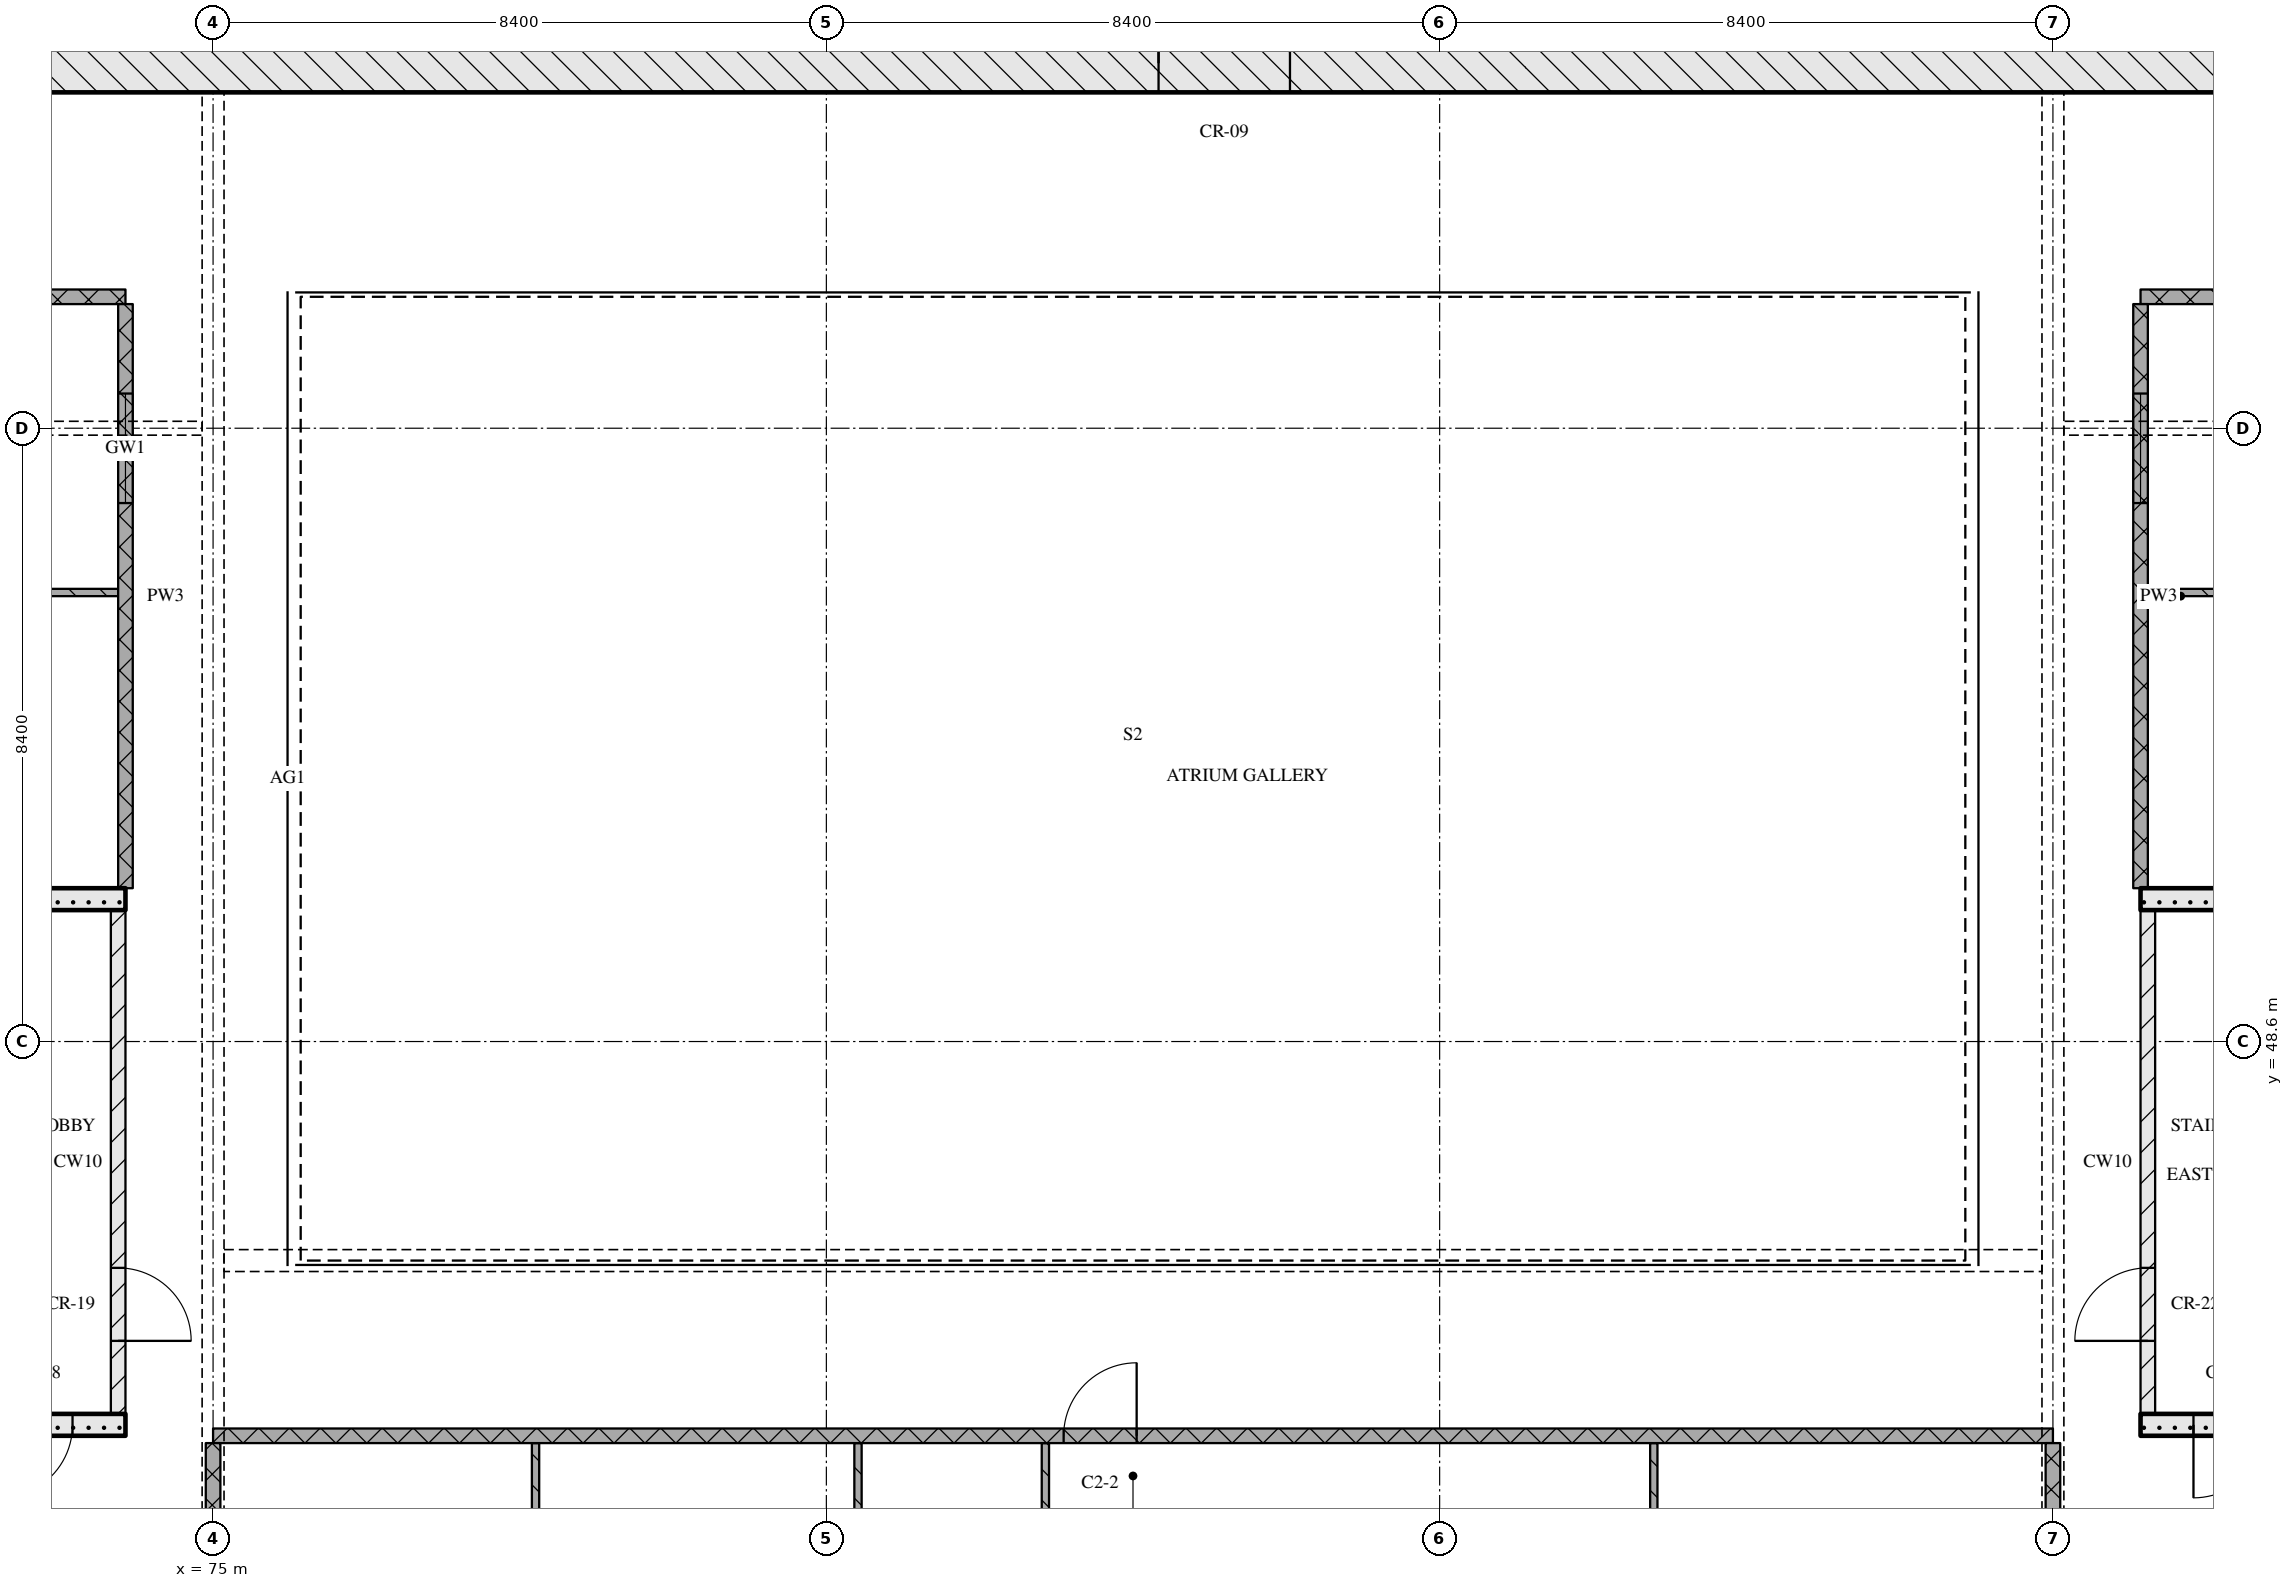
"""IFC4 building model, lengths in metres.
Left out: names, types, materials, properties, quantities, classifications, styles, units other than length and angle.
Written with IfcOpenShell. Run it as: python <this file> out.ifc"""

import sys

from ifc_helpers import new_model, si_unit, direction, frame, frame_2d, origin, place, context, subcontext, project, spatial, rectangle, extrude, element, fill, save


model = new_model("IFC4")
c1 = context("Model", 3, precision=1e-05, world=origin(), true_north=direction((0.0, 1.0)))
c2 = subcontext(c1, "Body", "Model", "MODEL_VIEW")
j1 = project(units=[si_unit("LENGTHUNIT", "METRE"), si_unit("PLANEANGLEUNIT", "RADIAN")], contexts=[c1])
p1 = place(None, origin())
s1 = spatial("IfcSite", under=j1, at=p1, CompositionType="ELEMENT")
p2 = place(p1, origin())
s2 = spatial("IfcBuilding", under=s1, at=p2, CompositionType="ELEMENT")
p3 = place(p2, frame((0.0, 0.0, 158.25)))
s3 = spatial("IfcBuildingStorey", under=s2, at=p3, CompositionType="ELEMENT", Elevation=158.25)
p4 = place(p3, frame((67.0, 62.0, 0.0), z_axis=(0.0, 0.0, 1.0), x_axis=(1.0, 0.0, 0.0)))
e1 = element("IfcWall", 1, at=p4, inside=s3, PredefinedType="SOLIDWALL", context=c2, shape_type="SweptSolid", body=[
    extrude(rectangle(XDim=41.2, YDim=0.8, at=frame_2d((20.6, 0.0))), origin(), (0.0, 0.0, 1.0), 3.32),
])
p5 = place(p4, frame((20.95, 0.0, 0.0)))
e2 = element("IfcOpeningElement", 2, at=p5, cuts=e1, PredefinedType="OPENING", context=c2, shape_type="SweptSolid", body=[
    extrude(rectangle(XDim=1.8, YDim=2.1, at=frame_2d((0.9, 1.05))), frame((0.0, 0.41, 0.0), z_axis=(0.0, -1.0, 0.0), x_axis=(1.0, 0.0, 0.0)), (0.0, 0.0, 1.0), 0.82),
])
p6 = place(p3, frame((68.2, 43.35, 0.0), z_axis=(0.0, 0.0, 1.0), x_axis=(1.0, 0.0, 0.0)))
e3 = element("IfcWall", 3, at=p6, inside=s3, PredefinedType="SOLIDWALL", context=c2, shape_type="SweptSolid", body=[
    extrude(rectangle(XDim=5.6, YDim=0.3, at=frame_2d((2.8, 0.0))), origin(), (0.0, 0.0, 1.0), 3.32),
])
p7 = place(p6, frame((3.875, 0.0, 0.0)))
e4 = element("IfcOpeningElement", 4, at=p7, cuts=e3, PredefinedType="OPENING", context=c2, shape_type="SweptSolid", body=[
    extrude(rectangle(XDim=1.0, YDim=2.1, at=frame_2d((0.5, 1.05))), frame((0.0, 0.16, 0.0), z_axis=(0.0, -1.0, 0.0), x_axis=(1.0, 0.0, 0.0)), (0.0, 0.0, 1.0), 0.32),
])
p8 = place(p3, frame((73.7, 43.5, 0.0), z_axis=(0.0, 0.0, 1.0), x_axis=(0.0, 1.0, 0.0)))
e5 = element("IfcWall", 5, at=p8, inside=s3, PredefinedType="PARTITIONING", context=c2, shape_type="SweptSolid", body=[
    extrude(rectangle(XDim=6.9, YDim=0.2, at=frame_2d((3.45, 0.0))), origin(), (0.0, 0.0, 1.0), 3.32),
])
p9 = place(p8, frame((1.0, 0.0, 0.0)))
e6 = element("IfcOpeningElement", 6, at=p9, cuts=e5, PredefinedType="OPENING", context=c2, shape_type="SweptSolid", body=[
    extrude(rectangle(XDim=1.0, YDim=2.1, at=frame_2d((0.5, 1.05))), frame((0.0, 0.11, 0.0), z_axis=(0.0, -1.0, 0.0), x_axis=(1.0, 0.0, 0.0)), (0.0, 0.0, 1.0), 0.22),
])
p10 = place(p3, frame((68.2, 50.55, 0.0), z_axis=(0.0, 0.0, 1.0), x_axis=(1.0, 0.0, 0.0)))
e7 = element("IfcWall", 7, at=p10, inside=s3, PredefinedType="SOLIDWALL", context=c2, shape_type="SweptSolid", body=[
    extrude(rectangle(XDim=5.6, YDim=0.3, at=frame_2d((2.8, 0.0))), origin(), (0.0, 0.0, 1.0), 3.32),
])
p11 = place(p3, frame((101.4, 43.35, 0.0), z_axis=(0.0, 0.0, 1.0), x_axis=(1.0, 0.0, 0.0)))
e8 = element("IfcWall", 8, at=p11, inside=s3, PredefinedType="SOLIDWALL", context=c2, shape_type="SweptSolid", body=[
    extrude(rectangle(XDim=5.6, YDim=0.3, at=frame_2d((2.8, 0.0))), origin(), (0.0, 0.0, 1.0), 3.32),
])
p12 = place(p11, frame((0.725, 0.0, 0.0)))
e9 = element("IfcOpeningElement", 9, at=p12, cuts=e8, PredefinedType="OPENING", context=c2, shape_type="SweptSolid", body=[
    extrude(rectangle(XDim=1.0, YDim=2.1, at=frame_2d((0.5, 1.05))), frame((0.0, 0.16, 0.0), z_axis=(0.0, -1.0, 0.0), x_axis=(1.0, 0.0, 0.0)), (0.0, 0.0, 1.0), 0.32),
])
p13 = place(p3, frame((101.5, 43.5, 0.0), z_axis=(0.0, 0.0, 1.0), x_axis=(0.0, 1.0, 0.0)))
e10 = element("IfcWall", 10, at=p13, inside=s3, PredefinedType="PARTITIONING", context=c2, shape_type="SweptSolid", body=[
    extrude(rectangle(XDim=6.9, YDim=0.2, at=frame_2d((3.45, 0.0))), origin(), (0.0, 0.0, 1.0), 3.32),
])
p14 = place(p13, frame((1.0, 0.0, 0.0)))
e11 = element("IfcOpeningElement", 11, at=p14, cuts=e10, PredefinedType="OPENING", context=c2, shape_type="SweptSolid", body=[
    extrude(rectangle(XDim=1.0, YDim=2.1, at=frame_2d((0.5, 1.05))), frame((0.0, 0.11, 0.0), z_axis=(0.0, -1.0, 0.0), x_axis=(1.0, 0.0, 0.0)), (0.0, 0.0, 1.0), 0.22),
])
p15 = place(p3, frame((101.4, 50.55, 0.0), z_axis=(0.0, 0.0, 1.0), x_axis=(1.0, 0.0, 0.0)))
e12 = element("IfcWall", 12, at=p15, inside=s3, PredefinedType="SOLIDWALL", context=c2, shape_type="SweptSolid", body=[
    extrude(rectangle(XDim=5.6, YDim=0.3, at=frame_2d((2.8, 0.0))), origin(), (0.0, 0.0, 1.0), 3.32),
])
p16 = place(p3, frame((100.2, 43.2, 0.0), z_axis=(0.0, 0.0, 1.0), x_axis=(-1.0, 0.0, 0.0)))
e13 = element("IfcWall", 13, at=p16, inside=s3, PredefinedType="PARTITIONING", context=c2, shape_type="SweptSolid", body=[
    extrude(rectangle(XDim=25.2, YDim=0.2, at=frame_2d((12.6, 0.0))), origin(), (0.0, 0.0, 1.0), 3.32),
])
p17 = place(p16, frame((12.55, 0.0, 0.0)))
e14 = element("IfcOpeningElement", 14, at=p17, cuts=e13, PredefinedType="OPENING", context=c2, shape_type="SweptSolid", body=[
    extrude(rectangle(XDim=1.0, YDim=2.1, at=frame_2d((0.5, 1.05))), frame((0.0, 0.11, 0.0), z_axis=(0.0, -1.0, 0.0), x_axis=(1.0, 0.0, 0.0)), (0.0, 0.0, 1.0), 0.22),
])
p18 = place(p3, frame((67.5, 54.75, 0.0), z_axis=(0.0, 0.0, 1.0), x_axis=(1.0, 0.0, 0.0)))
e15 = element("IfcWall", 15, at=p18, inside=s3, PredefinedType="PARTITIONING", context=c2, shape_type="SweptSolid", body=[
    extrude(rectangle(XDim=6.2, YDim=0.1, at=frame_2d((3.1, 0.0))), origin(), (0.0, 0.0, 1.0), 3.32),
])
p19 = place(p3, frame((101.5, 54.75, 0.0), z_axis=(0.0, 0.0, 1.0), x_axis=(1.0, 0.0, 0.0)))
e16 = element("IfcWall", 16, at=p19, inside=s3, PredefinedType="PARTITIONING", context=c2, shape_type="SweptSolid", body=[
    extrude(rectangle(XDim=4.4, YDim=0.1, at=frame_2d((2.2, 0.0))), origin(), (0.0, 0.0, 1.0), 3.32),
])
p20 = place(p19, frame((1.7, 0.0, 0.0)))
e17 = element("IfcOpeningElement", 17, at=p20, cuts=e16, PredefinedType="OPENING", context=c2, shape_type="SweptSolid", body=[
    extrude(rectangle(XDim=0.9, YDim=2.1, at=frame_2d((0.45, 1.05))), frame((0.0, 0.06, 0.0), z_axis=(0.0, -1.0, 0.0), x_axis=(1.0, 0.0, 0.0)), (0.0, 0.0, 1.0), 0.12),
])
for number, where, z_axis, x_axis in (
    (18, (63.0, 58.8, 0.0), (0.0, 0.0, 1.0), (1.0, 0.0, 0.0)),
    (19, (101.4, 58.8, 0.0), (0.0, 0.0, 1.0), (1.0, 0.0, 0.0)),
):
    element("IfcWall", number, at=place(p3, frame(where, z_axis=z_axis, x_axis=x_axis)), inside=s3, PredefinedType="PARTITIONING", context=c2, shape_type="SweptSolid", body=[
        extrude(rectangle(XDim=10.8, YDim=0.2, at=frame_2d((5.4, 0.0))), origin(), (0.0, 0.0, 1.0), 3.32),
    ])
p21 = place(p3, frame((73.8, 58.7, 0.0), z_axis=(0.0, 0.0, 1.0), x_axis=(0.0, -1.0, 0.0)))
e20 = element("IfcWall", 20, at=p21, inside=s3, PredefinedType="PARTITIONING", context=c2, shape_type="SweptSolid", body=[
    extrude(rectangle(XDim=8.0, YDim=0.2, at=frame_2d((4.0, 0.0))), origin(), (0.0, 0.0, 1.0), 3.32),
])
p22 = place(p21, frame((1.225, 0.0, 0.9)))
e21 = element("IfcOpeningElement", 21, at=p22, cuts=e20, PredefinedType="OPENING", context=c2, shape_type="SweptSolid", body=[
    extrude(rectangle(XDim=1.5, YDim=1.5, at=frame_2d((0.75, 0.75))), frame((0.0, 0.11, 0.0), z_axis=(0.0, -1.0, 0.0), x_axis=(1.0, 0.0, 0.0)), (0.0, 0.0, 1.0), 0.22),
])
p23 = place(p3, frame((75.0, 43.1, 0.0), z_axis=(0.0, 0.0, 1.0), x_axis=(0.0, -1.0, 0.0)))
e22 = element("IfcWall", 22, at=p23, inside=s3, PredefinedType="PARTITIONING", context=c2, shape_type="SweptSolid", body=[
    extrude(rectangle(XDim=2.2, YDim=0.2, at=frame_2d((1.1, 0.0))), origin(), (0.0, 0.0, 1.0), 2.43),
])
for number, where, z_axis, x_axis in (
    (23, (79.417, 43.1, 0.0), (0.0, 0.0, 1.0), (0.0, -1.0, 0.0)),
    (24, (83.833, 43.1, 0.0), (0.0, 0.0, 1.0), (0.0, -1.0, 0.0)),
    (25, (86.4, 43.1, 0.0), (0.0, 0.0, 1.0), (0.0, -1.0, 0.0)),
    (26, (94.733, 43.1, 0.0), (0.0, 0.0, 1.0), (0.0, -1.0, 0.0)),
):
    element("IfcWall", number, at=place(p3, frame(where, z_axis=z_axis, x_axis=x_axis)), inside=s3, PredefinedType="PARTITIONING", context=c2, shape_type="SweptSolid", body=[
        extrude(rectangle(XDim=5.85, YDim=0.1, at=frame_2d((2.925, 0.0))), origin(), (0.0, 0.0, 1.0), 3.32),
    ])
p24 = place(p3, frame((100.2, 43.1, 0.0), z_axis=(0.0, 0.0, 1.0), x_axis=(0.0, -1.0, 0.0)))
e27 = element("IfcWall", 27, at=p24, inside=s3, PredefinedType="PARTITIONING", context=c2, shape_type="SweptSolid", body=[
    extrude(rectangle(XDim=2.2, YDim=0.2, at=frame_2d((1.1, 0.0))), origin(), (0.0, 0.0, 1.0), 2.43),
])
p25 = place(p3, frame((101.4, 58.7, 0.0), z_axis=(0.0, 0.0, 1.0), x_axis=(0.0, -1.0, 0.0)))
e28 = element("IfcWall", 28, at=p25, inside=s3, PredefinedType="PARTITIONING", context=c2, shape_type="SweptSolid", body=[
    extrude(rectangle(XDim=8.0, YDim=0.2, at=frame_2d((4.0, 0.0))), origin(), (0.0, 0.0, 1.0), 3.32),
])
p26 = place(p25, frame((1.225, 0.0, 0.9)))
e29 = element("IfcOpeningElement", 29, at=p26, cuts=e28, PredefinedType="OPENING", context=c2, shape_type="SweptSolid", body=[
    extrude(rectangle(XDim=1.5, YDim=1.5, at=frame_2d((0.75, 0.75))), frame((0.0, 0.11, 0.0), z_axis=(0.0, -1.0, 0.0), x_axis=(1.0, 0.0, 0.0)), (0.0, 0.0, 1.0), 0.22),
])
p27 = place(p5, origin())
e30 = element("IfcDoor", 30, at=p27, inside=s3, OperationType="DOUBLE_DOOR_SINGLE_SWING", PredefinedType="DOOR", context=c2, shape_type="SweptSolid", body=[
    extrude(rectangle(XDim=1.8, YDim=2.1, at=frame_2d((0.9, 1.05))), frame((0.0, 0.025, 0.0), z_axis=(0.0, -1.0, 0.0), x_axis=(1.0, 0.0, 0.0)), (0.0, 0.0, 1.0), 0.05),
])
fill(e2, e30)
p28 = place(p7, origin())
e31 = element("IfcDoor", 31, at=p28, inside=s3, OperationType="SINGLE_SWING_RIGHT", PredefinedType="DOOR", context=c2, shape_type="SweptSolid", body=[
    extrude(rectangle(XDim=1.0, YDim=2.1, at=frame_2d((0.5, 1.05))), frame((0.0, 0.025, 0.0), z_axis=(0.0, -1.0, 0.0), x_axis=(1.0, 0.0, 0.0)), (0.0, 0.0, 1.0), 0.05),
])
fill(e4, e31)
p29 = place(p9, origin())
e32 = element("IfcDoor", 32, at=p29, inside=s3, OperationType="SINGLE_SWING_RIGHT", PredefinedType="DOOR", context=c2, shape_type="SweptSolid", body=[
    extrude(rectangle(XDim=1.0, YDim=2.1, at=frame_2d((0.5, 1.05))), frame((0.0, 0.025, 0.0), z_axis=(0.0, -1.0, 0.0), x_axis=(1.0, 0.0, 0.0)), (0.0, 0.0, 1.0), 0.05),
])
fill(e6, e32)
p30 = place(p12, origin())
e33 = element("IfcDoor", 33, at=p30, inside=s3, OperationType="SINGLE_SWING_RIGHT", PredefinedType="DOOR", context=c2, shape_type="SweptSolid", body=[
    extrude(rectangle(XDim=1.0, YDim=2.1, at=frame_2d((0.5, 1.05))), frame((0.0, 0.025, 0.0), z_axis=(0.0, -1.0, 0.0), x_axis=(1.0, 0.0, 0.0)), (0.0, 0.0, 1.0), 0.05),
])
fill(e9, e33)
p31 = place(p14, origin())
e34 = element("IfcDoor", 34, at=p31, inside=s3, OperationType="SINGLE_SWING_LEFT", PredefinedType="DOOR", context=c2, shape_type="SweptSolid", body=[
    extrude(rectangle(XDim=1.0, YDim=2.1, at=frame_2d((0.5, 1.05))), frame((0.0, 0.025, 0.0), z_axis=(0.0, -1.0, 0.0), x_axis=(1.0, 0.0, 0.0)), (0.0, 0.0, 1.0), 0.05),
])
fill(e11, e34)
p32 = place(p17, origin())
e35 = element("IfcDoor", 35, at=p32, inside=s3, OperationType="SINGLE_SWING_RIGHT", PredefinedType="DOOR", context=c2, shape_type="SweptSolid", body=[
    extrude(rectangle(XDim=1.0, YDim=2.1, at=frame_2d((0.5, 1.05))), frame((0.0, 0.025, 0.0), z_axis=(0.0, -1.0, 0.0), x_axis=(1.0, 0.0, 0.0)), (0.0, 0.0, 1.0), 0.05),
])
fill(e14, e35)
p33 = place(p22, origin())
e36 = element("IfcWindow", 36, at=p33, inside=s3, PartitioningType="SINGLE_PANEL", PredefinedType="WINDOW", context=c2, shape_type="SweptSolid", body=[
    extrude(rectangle(XDim=1.5, YDim=1.5, at=frame_2d((0.75, 0.75))), frame((0.0, 0.03, 0.0), z_axis=(0.0, -1.0, 0.0), x_axis=(1.0, 0.0, 0.0)), (0.0, 0.0, 1.0), 0.06),
])
fill(e21, e36)
p34 = place(p26, origin())
e37 = element("IfcWindow", 37, at=p34, inside=s3, PartitioningType="SINGLE_PANEL", PredefinedType="WINDOW", context=c2, shape_type="SweptSolid", body=[
    extrude(rectangle(XDim=1.5, YDim=1.5, at=frame_2d((0.75, 0.75))), frame((0.0, 0.03, 0.0), z_axis=(0.0, -1.0, 0.0), x_axis=(1.0, 0.0, 0.0)), (0.0, 0.0, 1.0), 0.06),
])
fill(e29, e37)
save(model, sys.argv[1])
